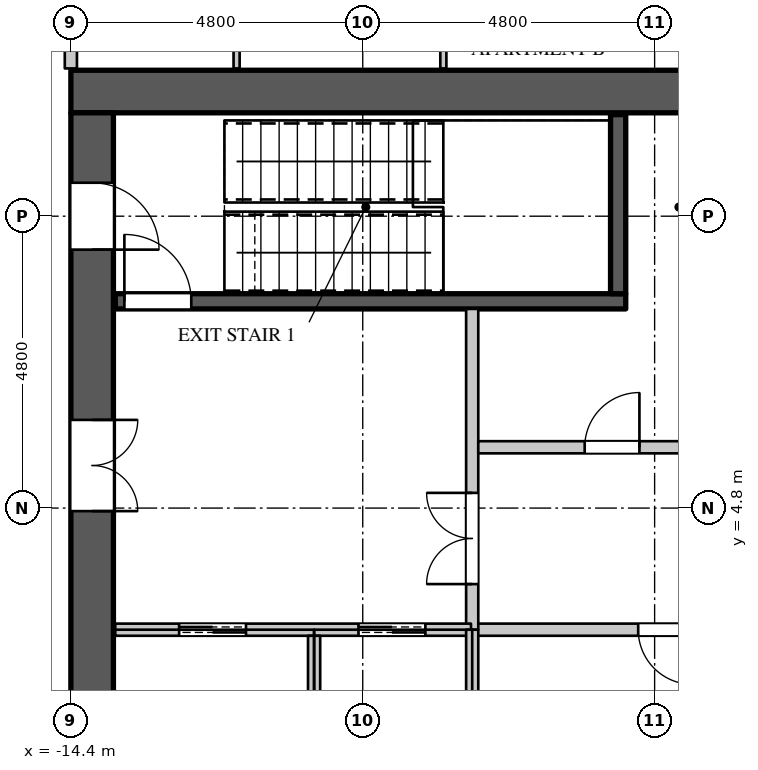
"""IFC4 building model, lengths in metres.
Left out: names, types, materials, properties, quantities, classifications, styles, units other than length and angle.
Written with IfcOpenShell. Run it as: python <this file> out.ifc"""

import sys

from ifc_helpers import new_model, si_unit, direction, frame, frame_2d, origin, place, context, subcontext, project, spatial, rectangle, extrude, element, fill, save


model = new_model("IFC4")
c1 = context("Model", 3, precision=1e-05, world=origin(), true_north=direction((0.0, 1.0)))
c2 = subcontext(c1, "Body", "Model", "MODEL_VIEW")
j1 = project(units=[si_unit("LENGTHUNIT", "METRE"), si_unit("PLANEANGLEUNIT", "RADIAN")], contexts=[c1])
p1 = place(None, origin())
s1 = spatial("IfcSite", under=j1, at=p1, CompositionType="ELEMENT")
p2 = place(p1, origin())
s2 = spatial("IfcBuilding", under=s1, at=p2, CompositionType="ELEMENT")
p3 = place(p2, frame((0.0, 0.0, 166.5)))
s3 = spatial("IfcBuildingStorey", under=s2, at=p3, CompositionType="ELEMENT", Elevation=166.5)
p4 = place(p3, frame((-14.4, 11.65, 0.0), z_axis=(0.0, 0.0, 1.0), x_axis=(1.0, 0.0, 0.0)))
e1 = element("IfcWall", 1, at=p4, inside=s3, PredefinedType="SHEAR", context=c2, shape_type="SweptSolid", body=[
    extrude(rectangle(XDim=28.8, YDim=0.7, at=frame_2d((14.4, 0.0))), origin(), (0.0, 0.0, 1.0), 4.2),
])
p5 = place(p3, frame((-14.05, -11.3, 0.0), z_axis=(0.0, 0.0, 1.0), x_axis=(0.0, 1.0, 0.0)))
e2 = element("IfcWall", 2, at=p5, inside=s3, PredefinedType="SHEAR", context=c2, shape_type="SweptSolid", body=[
    extrude(rectangle(XDim=22.6, YDim=0.7, at=frame_2d((11.3, 0.0))), origin(), (0.0, 0.0, 1.0), 4.2),
])
p6 = place(p5, frame((20.35, 0.0, 0.0)))
e3 = element("IfcOpeningElement", 3, at=p6, cuts=e2, PredefinedType="OPENING", context=c2, shape_type="SweptSolid", body=[
    extrude(rectangle(XDim=1.1, YDim=2.2, at=frame_2d((0.55, 1.1))), frame((0.0, 0.36, 0.0), z_axis=(0.0, -1.0, 0.0), x_axis=(1.0, 0.0, 0.0)), (0.0, 0.0, 1.0), 0.72),
])
p7 = place(p5, frame((1.15, 0.0, 0.0)))
e4 = element("IfcOpeningElement", 4, at=p7, cuts=e2, PredefinedType="OPENING", context=c2, shape_type="SweptSolid", body=[
    extrude(rectangle(XDim=1.1, YDim=2.2, at=frame_2d((0.55, 1.1))), frame((0.0, 0.36, 0.0), z_axis=(0.0, -1.0, 0.0), x_axis=(1.0, 0.0, 0.0)), (0.0, 0.0, 1.0), 0.72),
])
p8 = place(p5, frame((16.05, 0.0, 0.0)))
e5 = element("IfcOpeningElement", 5, at=p8, cuts=e2, PredefinedType="OPENING", context=c2, shape_type="SweptSolid", body=[
    extrude(rectangle(XDim=1.5, YDim=2.4, at=frame_2d((0.75, 1.2))), frame((0.0, 0.36, 0.0), z_axis=(0.0, -1.0, 0.0), x_axis=(1.0, 0.0, 0.0)), (0.0, 0.0, 1.0), 0.72),
])
p9 = place(p5, frame((5.05, 0.0, 0.0)))
e6 = element("IfcOpeningElement", 6, at=p9, cuts=e2, PredefinedType="OPENING", context=c2, shape_type="SweptSolid", body=[
    extrude(rectangle(XDim=1.5, YDim=2.4, at=frame_2d((0.75, 1.2))), frame((0.0, 0.36, 0.0), z_axis=(0.0, -1.0, 0.0), x_axis=(1.0, 0.0, 0.0)), (0.0, 0.0, 1.0), 0.72),
])
p10 = place(p3, frame((-14.4, 12.03, 0.0), z_axis=(0.0, 0.0, 1.0), x_axis=(0.0, 1.0, 0.0)))
e7 = element("IfcWall", 7, at=p10, inside=s3, PredefinedType="PARTITIONING", context=c2, shape_type="SweptSolid", body=[
    extrude(rectangle(XDim=2.27, YDim=0.2, at=frame_2d((1.135, 0.0))), origin(), (0.0, 0.0, 1.0), 3.95),
])
p11 = place(p3, frame((-7.82, 2.8, 0.0), z_axis=(0.0, 0.0, 1.0), x_axis=(1.0, 0.0, 0.0)))
e8 = element("IfcWall", 8, at=p11, inside=s3, PredefinedType="PARTITIONING", context=c2, shape_type="SweptSolid", body=[
    extrude(rectangle(XDim=18.24, YDim=0.2, at=frame_2d((9.12, 0.0))), origin(), (0.0, 0.0, 1.0), 3.95),
])
p12 = place(p11, frame((2.75, 0.0, 0.0)))
e9 = element("IfcOpeningElement", 9, at=p12, cuts=e8, PredefinedType="OPENING", context=c2, shape_type="SweptSolid", body=[
    extrude(rectangle(XDim=0.9, YDim=2.2, at=frame_2d((0.45, 1.1))), frame((0.0, 0.11, 0.0), z_axis=(0.0, -1.0, 0.0), x_axis=(1.0, 0.0, 0.0)), (0.0, 0.0, 1.0), 0.22),
])
p13 = place(p11, frame((9.55, 0.0, 0.0)))
e10 = element("IfcOpeningElement", 10, at=p13, cuts=e8, PredefinedType="OPENING", context=c2, shape_type="SweptSolid", body=[
    extrude(rectangle(XDim=0.9, YDim=2.2, at=frame_2d((0.45, 1.1))), frame((0.0, 0.11, 0.0), z_axis=(0.0, -1.0, 0.0), x_axis=(1.0, 0.0, 0.0)), (0.0, 0.0, 1.0), 0.22),
])
p14 = place(p11, frame((15.5, 0.0, 0.0)))
e11 = element("IfcOpeningElement", 11, at=p14, cuts=e8, PredefinedType="OPENING", context=c2, shape_type="SweptSolid", body=[
    extrude(rectangle(XDim=0.9, YDim=2.2, at=frame_2d((0.45, 1.1))), frame((0.0, 0.11, 0.0), z_axis=(0.0, -1.0, 0.0), x_axis=(1.0, 0.0, 0.0)), (0.0, 0.0, 1.0), 0.22),
])
p15 = place(p3, frame((-7.8, 2.8, 0.0), z_axis=(0.0, 0.0, 1.0), x_axis=(0.0, 1.0, 0.0)))
e12 = element("IfcWall", 12, at=p15, inside=s3, PredefinedType="PARTITIONING", context=c2, shape_type="SweptSolid", body=[
    extrude(rectangle(XDim=5.275, YDim=0.2, at=frame_2d((2.637, 0.0))), origin(), (0.0, 0.0, 1.0), 3.95),
])
p16 = place(p15, frame((0.75, 0.0, 0.0)))
e13 = element("IfcOpeningElement", 13, at=p16, cuts=e12, PredefinedType="OPENING", context=c2, shape_type="SweptSolid", body=[
    extrude(rectangle(XDim=1.5, YDim=2.4, at=frame_2d((0.75, 1.2))), frame((0.0, 0.11, 0.0), z_axis=(0.0, -1.0, 0.0), x_axis=(1.0, 0.0, 0.0)), (0.0, 0.0, 1.0), 0.22),
])
p17 = place(p3, frame((-7.7, 5.8, 0.0), z_axis=(0.0, 0.0, 1.0), x_axis=(1.0, 0.0, 0.0)))
e14 = element("IfcWall", 14, at=p17, inside=s3, PredefinedType="PARTITIONING", context=c2, shape_type="SweptSolid", body=[
    extrude(rectangle(XDim=16.52, YDim=0.2, at=frame_2d((8.26, 0.0))), origin(), (0.0, 0.0, 1.0), 3.95),
])
p18 = place(p17, frame((1.75, 0.0, 0.0)))
e15 = element("IfcOpeningElement", 15, at=p18, cuts=e14, PredefinedType="OPENING", context=c2, shape_type="SweptSolid", body=[
    extrude(rectangle(XDim=0.9, YDim=2.2, at=frame_2d((0.45, 1.1))), frame((0.0, 0.11, 0.0), z_axis=(0.0, -1.0, 0.0), x_axis=(1.0, 0.0, 0.0)), (0.0, 0.0, 1.0), 0.22),
])
p19 = place(p17, frame((6.5, 0.0, 0.0)))
e16 = element("IfcOpeningElement", 16, at=p19, cuts=e14, PredefinedType="OPENING", context=c2, shape_type="SweptSolid", body=[
    extrude(rectangle(XDim=0.9, YDim=2.2, at=frame_2d((0.45, 1.1))), frame((0.0, 0.11, 0.0), z_axis=(0.0, -1.0, 0.0), x_axis=(1.0, 0.0, 0.0)), (0.0, 0.0, 1.0), 0.22),
])
p20 = place(p17, frame((10.9, 0.0, 0.0)))
e17 = element("IfcOpeningElement", 17, at=p20, cuts=e14, PredefinedType="OPENING", context=c2, shape_type="SweptSolid", body=[
    extrude(rectangle(XDim=0.9, YDim=2.2, at=frame_2d((0.45, 1.1))), frame((0.0, 0.11, 0.0), z_axis=(0.0, -1.0, 0.0), x_axis=(1.0, 0.0, 0.0)), (0.0, 0.0, 1.0), 0.22),
])
p21 = place(p17, frame((14.3, 0.0, 0.0)))
e18 = element("IfcOpeningElement", 18, at=p21, cuts=e14, PredefinedType="OPENING", context=c2, shape_type="SweptSolid", body=[
    extrude(rectangle(XDim=0.9, YDim=2.2, at=frame_2d((0.45, 1.1))), frame((0.0, 0.11, 0.0), z_axis=(0.0, -1.0, 0.0), x_axis=(1.0, 0.0, 0.0)), (0.0, 0.0, 1.0), 0.22),
])
p22 = place(p3, frame((-13.67, 2.8, 0.0), z_axis=(0.0, 0.0, 1.0), x_axis=(1.0, 0.0, 0.0)))
e19 = element("IfcWall", 19, at=p22, inside=s3, PredefinedType="PARTITIONING", context=c2, shape_type="SweptSolid", body=[
    extrude(rectangle(XDim=5.85, YDim=0.2, at=frame_2d((2.925, 0.0))), origin(), (0.0, 0.0, 1.0), 3.95),
])
p23 = place(p22, frame((1.05, 0.0, 0.0)))
e20 = element("IfcOpeningElement", 20, at=p23, cuts=e19, PredefinedType="OPENING", context=c2, shape_type="SweptSolid", body=[
    extrude(rectangle(XDim=1.1, YDim=2.2, at=frame_2d((0.55, 1.1))), frame((0.0, 0.11, 0.0), z_axis=(0.0, -1.0, 0.0), x_axis=(1.0, 0.0, 0.0)), (0.0, 0.0, 1.0), 0.22),
])
p24 = place(p22, frame((4.0, 0.0, 0.0)))
e21 = element("IfcOpeningElement", 21, at=p24, cuts=e19, PredefinedType="OPENING", context=c2, shape_type="SweptSolid", body=[
    extrude(rectangle(XDim=1.1, YDim=2.2, at=frame_2d((0.55, 1.1))), frame((0.0, 0.11, 0.0), z_axis=(0.0, -1.0, 0.0), x_axis=(1.0, 0.0, 0.0)), (0.0, 0.0, 1.0), 0.22),
])
p25 = place(p3, frame((-10.4, 0.0, 0.0), z_axis=(0.0, 0.0, 1.0), x_axis=(0.0, 1.0, 0.0)))
e22 = element("IfcWall", 22, at=p25, inside=s3, PredefinedType="PARTITIONING", context=c2, shape_type="SweptSolid", body=[
    extrude(rectangle(XDim=2.7, YDim=0.2, at=frame_2d((1.35, 0.0))), origin(), (0.0, 0.0, 1.0), 3.95),
])
p26 = place(p3, frame((-7.8, 0.0, 0.0), z_axis=(0.0, 0.0, 1.0), x_axis=(0.0, 1.0, 0.0)))
e23 = element("IfcWall", 23, at=p26, inside=s3, PredefinedType="PARTITIONING", context=c2, shape_type="SweptSolid", body=[
    extrude(rectangle(XDim=2.8, YDim=0.2, at=frame_2d((1.4, 0.0))), origin(), (0.0, 0.0, 1.0), 3.95),
])
p27 = place(p3, frame((-13.67, 8.2, 0.0), z_axis=(0.0, 0.0, 1.0), x_axis=(1.0, 0.0, 0.0)))
e24 = element("IfcWall", 24, at=p27, inside=s3, PredefinedType="SHEAR", context=c2, shape_type="SweptSolid", body=[
    extrude(rectangle(XDim=8.395, YDim=0.25, at=frame_2d((4.198, 0.0))), origin(), (0.0, 0.0, 1.0), 3.95),
])
p28 = place(p27, frame((0.15, 0.0, 0.0)))
e25 = element("IfcOpeningElement", 25, at=p28, cuts=e24, PredefinedType="OPENING", context=c2, shape_type="SweptSolid", body=[
    extrude(rectangle(XDim=1.1, YDim=2.2, at=frame_2d((0.55, 1.1))), frame((0.0, 0.135, 0.0), z_axis=(0.0, -1.0, 0.0), x_axis=(1.0, 0.0, 0.0)), (0.0, 0.0, 1.0), 0.27),
])
p29 = place(p3, frame((-5.4, 8.325, 0.0), z_axis=(0.0, 0.0, 1.0), x_axis=(0.0, 1.0, 0.0)))
e26 = element("IfcWall", 26, at=p29, inside=s3, PredefinedType="SHEAR", context=c2, shape_type="SweptSolid", body=[
    extrude(rectangle(XDim=2.945, YDim=0.25, at=frame_2d((1.473, 0.0))), origin(), (0.0, 0.0, 1.0), 3.95),
])
p30 = place(p3, frame((-11.675, 12.03, 0.0), z_axis=(0.0, 0.0, 1.0), x_axis=(0.0, 1.0, 0.0)))
e27 = element("IfcWall", 27, at=p30, inside=s3, PredefinedType="PARTITIONING", context=c2, shape_type="SweptSolid", body=[
    extrude(rectangle(XDim=2.895, YDim=0.1, at=frame_2d((1.448, 0.0))), origin(), (0.0, 0.0, 1.0), 3.95),
])
p31 = place(p30, frame((0.95, 0.0, 0.0)))
e28 = element("IfcOpeningElement", 28, at=p31, cuts=e27, PredefinedType="OPENING", context=c2, shape_type="SweptSolid", body=[
    extrude(rectangle(XDim=0.9, YDim=2.2, at=frame_2d((0.45, 1.1))), frame((0.0, 0.06, 0.0), z_axis=(0.0, -1.0, 0.0), x_axis=(1.0, 0.0, 0.0)), (0.0, 0.0, 1.0), 0.12),
])
p32 = place(p3, frame((-8.274, 12.03, 0.0), z_axis=(0.0, 0.0, 1.0), x_axis=(0.0, 1.0, 0.0)))
e29 = element("IfcWall", 29, at=p32, inside=s3, PredefinedType="PARTITIONING", context=c2, shape_type="SweptSolid", body=[
    extrude(rectangle(XDim=2.95, YDim=0.1, at=frame_2d((1.475, 0.0))), origin(), (0.0, 0.0, 1.0), 3.95),
])
p33 = place(p18, origin())
e30 = element("IfcDoor", 30, at=p33, inside=s3, OperationType="SINGLE_SWING_RIGHT", PredefinedType="DOOR", context=c2, shape_type="SweptSolid", body=[
    extrude(rectangle(XDim=0.9, YDim=2.2, at=frame_2d((0.45, 1.1))), frame((0.0, 0.025, 0.0), z_axis=(0.0, -1.0, 0.0), x_axis=(1.0, 0.0, 0.0)), (0.0, 0.0, 1.0), 0.05),
])
fill(e15, e30)
p34 = place(p12, origin())
e31 = element("IfcDoor", 31, at=p34, inside=s3, OperationType="SINGLE_SWING_LEFT", PredefinedType="DOOR", context=c2, shape_type="SweptSolid", body=[
    extrude(rectangle(XDim=0.9, YDim=2.2, at=frame_2d((0.45, 1.1))), frame((0.0, 0.025, 0.0), z_axis=(0.0, -1.0, 0.0), x_axis=(1.0, 0.0, 0.0)), (0.0, 0.0, 1.0), 0.05),
])
fill(e9, e31)
p35 = place(p23, origin())
e32 = element("IfcDoor", 32, at=p35, inside=s3, OperationType="DOUBLE_DOOR_SLIDING", PredefinedType="DOOR", context=c2, shape_type="SweptSolid", body=[
    extrude(rectangle(XDim=1.1, YDim=2.2, at=frame_2d((0.55, 1.1))), frame((0.0, 0.025, 0.0), z_axis=(0.0, -1.0, 0.0), x_axis=(1.0, 0.0, 0.0)), (0.0, 0.0, 1.0), 0.05),
])
fill(e20, e32)
p36 = place(p24, origin())
e33 = element("IfcDoor", 33, at=p36, inside=s3, OperationType="DOUBLE_DOOR_SLIDING", PredefinedType="DOOR", context=c2, shape_type="SweptSolid", body=[
    extrude(rectangle(XDim=1.1, YDim=2.2, at=frame_2d((0.55, 1.1))), frame((0.0, 0.025, 0.0), z_axis=(0.0, -1.0, 0.0), x_axis=(1.0, 0.0, 0.0)), (0.0, 0.0, 1.0), 0.05),
])
fill(e21, e33)
p37 = place(p28, origin())
e34 = element("IfcDoor", 34, at=p37, inside=s3, OperationType="SINGLE_SWING_LEFT", PredefinedType="DOOR", context=c2, shape_type="SweptSolid", body=[
    extrude(rectangle(XDim=1.1, YDim=2.2, at=frame_2d((0.55, 1.1))), frame((0.0, 0.025, 0.0), z_axis=(0.0, -1.0, 0.0), x_axis=(1.0, 0.0, 0.0)), (0.0, 0.0, 1.0), 0.05),
])
fill(e25, e34)
p38 = place(p16, origin())
e35 = element("IfcDoor", 35, at=p38, inside=s3, OperationType="DOUBLE_DOOR_SINGLE_SWING", PredefinedType="DOOR", context=c2, shape_type="SweptSolid", body=[
    extrude(rectangle(XDim=1.5, YDim=2.4, at=frame_2d((0.75, 1.2))), frame((0.0, 0.025, 0.0), z_axis=(0.0, -1.0, 0.0), x_axis=(1.0, 0.0, 0.0)), (0.0, 0.0, 1.0), 0.05),
])
fill(e13, e35)
p39 = place(p6, origin())
e36 = element("IfcDoor", 36, at=p39, inside=s3, OperationType="SINGLE_SWING_RIGHT", PredefinedType="DOOR", context=c2, shape_type="SweptSolid", body=[
    extrude(rectangle(XDim=1.1, YDim=2.2, at=frame_2d((0.55, 1.1))), frame((0.0, -0.295, 0.0), z_axis=(0.0, -1.0, 0.0), x_axis=(1.0, 0.0, 0.0)), (0.0, 0.0, 1.0), 0.05),
])
fill(e3, e36)
p40 = place(p8, origin())
e37 = element("IfcDoor", 37, at=p40, inside=s3, OperationType="DOUBLE_DOOR_SINGLE_SWING", PredefinedType="DOOR", context=c2, shape_type="SweptSolid", body=[
    extrude(rectangle(XDim=1.5, YDim=2.4, at=frame_2d((0.75, 1.2))), frame((0.0, -0.295, 0.0), z_axis=(0.0, -1.0, 0.0), x_axis=(1.0, 0.0, 0.0)), (0.0, 0.0, 1.0), 0.05),
])
fill(e5, e37)
save(model, sys.argv[1])
